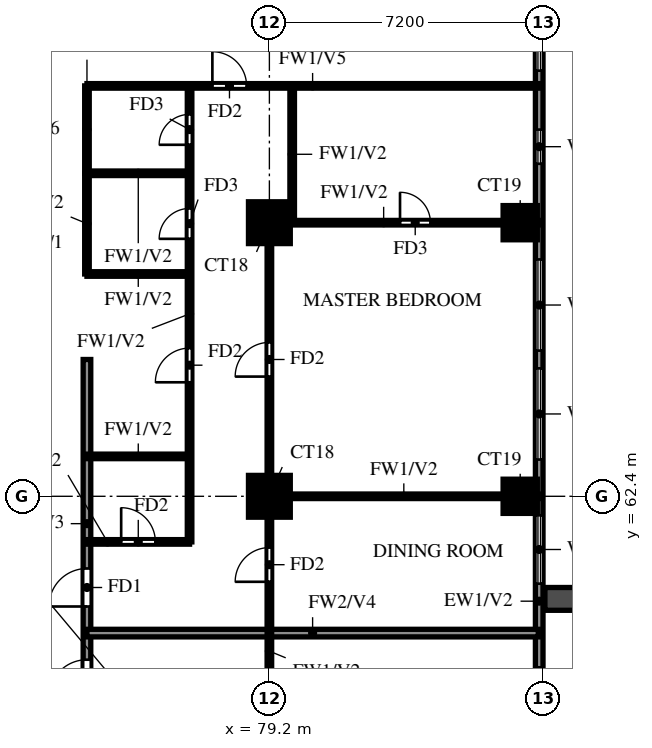
"""IFC4 building model, lengths in metres.
Left out: names, types, materials, properties, quantities, classifications, styles, units other than length and angle.
Written with IfcOpenShell. Run it as: python <this file> out.ifc"""

import sys

from ifc_helpers import new_model, si_unit, direction, frame, frame_2d, origin, origin_2d, place, context, subcontext, project, spatial, rectangle, extrude, source, transform, mapped, element, fill, save


model = new_model("IFC4")
c1 = context("Model", 3, precision=1e-05, world=origin(), true_north=direction((0.0, 1.0)))
c2 = subcontext(c1, "Body", "Model", "MODEL_VIEW")
j1 = project(units=[si_unit("LENGTHUNIT", "METRE"), si_unit("PLANEANGLEUNIT", "RADIAN")], contexts=[c1])
p1 = place(None, origin())
s1 = spatial("IfcSite", under=j1, at=p1, CompositionType="ELEMENT")
p2 = place(p1, origin())
s2 = spatial("IfcBuilding", under=s1, at=p2, CompositionType="ELEMENT")
p3 = place(p2, frame((0.0, 0.0, 120.0)))
s3 = spatial("IfcBuildingStorey", under=s2, at=p3, CompositionType="ELEMENT", Elevation=120.0)
m1 = source(origin(), c2, "Body", "SweptSolid", [
    extrude(rectangle(XDim=1.1, YDim=1.1, at=origin_2d()), origin(), (0.0, 0.0, 1.0), 3.2),
])
p4 = place(p3, frame((79.2, 62.4, 0.0), z_axis=(0.0, 0.0, 1.0), x_axis=(1.0, 0.0, 0.0)))
e1 = element("IfcColumn", 1, at=p4, inside=s3, PredefinedType="COLUMN", context=c2, shape_type="MappedRepresentation", body=[
    mapped(m1, transform((0.0, 0.0, 0.0))),
])
m2 = source(origin(), c2, "Body", "SweptSolid", [
    extrude(rectangle(XDim=0.9, YDim=0.9, at=origin_2d()), origin(), (0.0, 0.0, 1.0), 3.2),
])
p5 = place(p3, frame((85.8, 62.4, 0.0), z_axis=(0.0, 0.0, 1.0), x_axis=(1.0, 0.0, 0.0)))
e2 = element("IfcColumn", 2, at=p5, inside=s3, PredefinedType="COLUMN", context=c2, shape_type="MappedRepresentation", body=[
    mapped(m2, transform((0.0, 0.0, 0.0))),
])
p6 = place(p3, frame((79.2, 69.6, 0.0), z_axis=(0.0, 0.0, 1.0), x_axis=(1.0, 0.0, 0.0)))
e3 = element("IfcColumn", 3, at=p6, inside=s3, PredefinedType="COLUMN", context=c2, shape_type="MappedRepresentation", body=[
    mapped(m1, transform((0.0, 0.0, 0.0))),
])
p7 = place(p3, frame((85.8, 69.6, 0.0), z_axis=(0.0, 0.0, 1.0), x_axis=(1.0, 0.0, 0.0)))
e4 = element("IfcColumn", 4, at=p7, inside=s3, PredefinedType="COLUMN", context=c2, shape_type="MappedRepresentation", body=[
    mapped(m2, transform((0.0, 0.0, 0.0))),
])
p8 = place(p3, frame((86.3, 48.2, 0.0), z_axis=(0.0, 0.0, 1.0), x_axis=(0.0, 1.0, 0.0)))
e5 = element("IfcWall", 5, at=p8, inside=s3, PredefinedType="SOLIDWALL", context=c2, shape_type="SweptSolid", body=[
    extrude(rectangle(XDim=28.6, YDim=0.2, at=frame_2d((14.3, 0.0))), origin(), (0.0, 0.0, 1.0), 3.2),
])
p9 = place(p8, frame((7.9, 0.0, 0.0)))
e6 = element("IfcOpeningElement", 6, at=p9, cuts=e5, PredefinedType="OPENING", context=c2, shape_type="SweptSolid", body=[
    extrude(rectangle(XDim=1.8, YDim=2.4, at=frame_2d((0.9, 1.2))), frame((0.0, 0.11, 0.0), z_axis=(0.0, -1.0, 0.0), x_axis=(1.0, 0.0, 0.0)), (0.0, 0.0, 1.0), 0.22),
])
p10 = place(p8, frame((0.6, 0.0, 0.6)))
e7 = element("IfcOpeningElement", 7, at=p10, cuts=e5, PredefinedType="OPENING", context=c2, shape_type="SweptSolid", body=[
    extrude(rectangle(XDim=2.4, YDim=2.4, at=frame_2d((1.2, 1.2))), frame((0.0, 0.11, 0.0), z_axis=(0.0, -1.0, 0.0), x_axis=(1.0, 0.0, 0.0)), (0.0, 0.0, 1.0), 0.22),
])
p11 = place(p8, frame((3.55, 0.0, 0.6)))
e8 = element("IfcOpeningElement", 8, at=p11, cuts=e5, PredefinedType="OPENING", context=c2, shape_type="SweptSolid", body=[
    extrude(rectangle(XDim=0.9, YDim=2.4, at=frame_2d((0.45, 1.2))), frame((0.0, 0.11, 0.0), z_axis=(0.0, -1.0, 0.0), x_axis=(1.0, 0.0, 0.0)), (0.0, 0.0, 1.0), 0.22),
])
p12 = place(p8, frame((5.3, 0.0, 0.6)))
e9 = element("IfcOpeningElement", 9, at=p12, cuts=e5, PredefinedType="OPENING", context=c2, shape_type="SweptSolid", body=[
    extrude(rectangle(XDim=1.2, YDim=2.4, at=frame_2d((0.6, 1.2))), frame((0.0, 0.11, 0.0), z_axis=(0.0, -1.0, 0.0), x_axis=(1.0, 0.0, 0.0)), (0.0, 0.0, 1.0), 0.22),
])
p13 = place(p8, frame((11.9, 0.0, 0.6)))
e10 = element("IfcOpeningElement", 10, at=p13, cuts=e5, PredefinedType="OPENING", context=c2, shape_type="SweptSolid", body=[
    extrude(rectangle(XDim=1.8, YDim=2.4, at=frame_2d((0.9, 1.2))), frame((0.0, 0.11, 0.0), z_axis=(0.0, -1.0, 0.0), x_axis=(1.0, 0.0, 0.0)), (0.0, 0.0, 1.0), 0.22),
])
p14 = place(p8, frame((15.167, 0.0, 0.6)))
e11 = element("IfcOpeningElement", 11, at=p14, cuts=e5, PredefinedType="OPENING", context=c2, shape_type="SweptSolid", body=[
    extrude(rectangle(XDim=2.4, YDim=2.4, at=frame_2d((1.2, 1.2))), frame((0.0, 0.11, 0.0), z_axis=(0.0, -1.0, 0.0), x_axis=(1.0, 0.0, 0.0)), (0.0, 0.0, 1.0), 0.22),
])
p15 = place(p8, frame((18.033, 0.0, 0.6)))
e12 = element("IfcOpeningElement", 12, at=p15, cuts=e5, PredefinedType="OPENING", context=c2, shape_type="SweptSolid", body=[
    extrude(rectangle(XDim=2.4, YDim=2.4, at=frame_2d((1.2, 1.2))), frame((0.0, 0.11, 0.0), z_axis=(0.0, -1.0, 0.0), x_axis=(1.0, 0.0, 0.0)), (0.0, 0.0, 1.0), 0.22),
])
p16 = place(p8, frame((22.95, 0.0, 1.5)))
e13 = element("IfcOpeningElement", 13, at=p16, cuts=e5, PredefinedType="OPENING", context=c2, shape_type="SweptSolid", body=[
    extrude(rectangle(XDim=0.9, YDim=0.9, at=frame_2d((0.45, 0.45))), frame((0.0, 0.11, 0.0), z_axis=(0.0, -1.0, 0.0), x_axis=(1.0, 0.0, 0.0)), (0.0, 0.0, 1.0), 0.22),
])
p17 = place(p8, frame((25.4, 0.0, 0.6)))
e14 = element("IfcOpeningElement", 14, at=p17, cuts=e5, PredefinedType="OPENING", context=c2, shape_type="SweptSolid", body=[
    extrude(rectangle(XDim=2.4, YDim=2.4, at=frame_2d((1.2, 1.2))), frame((0.0, 0.11, 0.0), z_axis=(0.0, -1.0, 0.0), x_axis=(1.0, 0.0, 0.0)), (0.0, 0.0, 1.0), 0.22),
])
p18 = place(p3, frame((86.45, 59.7, 0.0), z_axis=(0.0, 0.0, 1.0), x_axis=(1.0, 0.0, 0.0)))
e15 = element("IfcWall", 15, at=p18, inside=s3, PredefinedType="SOLIDWALL", context=c2, shape_type="SweptSolid", body=[
    extrude(rectangle(XDim=2.65, YDim=0.6, at=frame_2d((1.325, 0.0))), origin(), (0.0, 0.0, 1.0), 2.85),
])
p19 = place(p3, frame((74.4, 56.4, 0.0), z_axis=(0.0, 0.0, 1.0), x_axis=(0.0, 1.0, 0.0)))
e16 = element("IfcWall", 16, at=p19, inside=s3, PredefinedType="SOLIDWALL", context=c2, shape_type="SweptSolid", body=[
    extrude(rectangle(XDim=9.6, YDim=0.2, at=frame_2d((4.8, 0.0))), origin(), (0.0, 0.0, 1.0), 3.2),
])
p20 = place(p19, frame((0.7, 0.0, 0.0)))
e17 = element("IfcOpeningElement", 17, at=p20, cuts=e16, PredefinedType="OPENING", context=c2, shape_type="SweptSolid", body=[
    extrude(rectangle(XDim=1.0, YDim=2.1, at=frame_2d((0.5, 1.05))), frame((0.0, 0.11, 0.0), z_axis=(0.0, -1.0, 0.0), x_axis=(1.0, 0.0, 0.0)), (0.0, 0.0, 1.0), 0.22),
])
p21 = place(p19, frame((3.1, 0.0, 0.0)))
e18 = element("IfcOpeningElement", 18, at=p21, cuts=e16, PredefinedType="OPENING", context=c2, shape_type="SweptSolid", body=[
    extrude(rectangle(XDim=1.0, YDim=2.1, at=frame_2d((0.5, 1.05))), frame((0.0, 0.11, 0.0), z_axis=(0.0, -1.0, 0.0), x_axis=(1.0, 0.0, 0.0)), (0.0, 0.0, 1.0), 0.22),
])
p22 = place(p3, frame((74.4, 58.8, 0.0), z_axis=(0.0, 0.0, 1.0), x_axis=(1.0, 0.0, 0.0)))
e19 = element("IfcWall", 19, at=p22, inside=s3, PredefinedType="SOLIDWALL", context=c2, shape_type="SweptSolid", body=[
    extrude(rectangle(XDim=11.875, YDim=0.2, at=frame_2d((5.938, 0.0))), origin(), (0.0, 0.0, 1.0), 2.3),
])
p23 = place(p3, frame((74.4, 61.2, 0.0), z_axis=(0.0, 0.0, 1.0), x_axis=(1.0, 0.0, 0.0)))
e20 = element("IfcWall", 20, at=p23, inside=s3, PredefinedType="PARTITIONING", context=c2, shape_type="SweptSolid", body=[
    extrude(rectangle(XDim=2.7, YDim=0.12, at=frame_2d((1.35, 0.0))), origin(), (0.0, 0.0, 1.0), 3.2),
])
p24 = place(p23, frame((0.9, 0.0, 0.0)))
e21 = element("IfcOpeningElement", 21, at=p24, cuts=e20, PredefinedType="OPENING", context=c2, shape_type="SweptSolid", body=[
    extrude(rectangle(XDim=0.9, YDim=2.1, at=frame_2d((0.45, 1.05))), frame((0.0, 0.07, 0.0), z_axis=(0.0, -1.0, 0.0), x_axis=(1.0, 0.0, 0.0)), (0.0, 0.0, 1.0), 0.14),
])
p25 = place(p3, frame((79.2, 62.4, 0.0), z_axis=(0.0, 0.0, 1.0), x_axis=(1.0, 0.0, 0.0)))
e22 = element("IfcWall", 22, at=p25, inside=s3, PredefinedType="PARTITIONING", context=c2, shape_type="SweptSolid", body=[
    extrude(rectangle(XDim=7.075, YDim=0.12, at=frame_2d((3.538, 0.0))), origin(), (0.0, 0.0, 1.0), 3.2),
])
for number, where, z_axis, x_axis in (
    (23, (74.4, 63.45, 0.0), (0.0, 0.0, 1.0), (1.0, 0.0, 0.0)),
    (24, (74.4, 68.25, 0.0), (0.0, 0.0, 1.0), (1.0, 0.0, 0.0)),
):
    element("IfcWall", number, at=place(p3, frame(where, z_axis=z_axis, x_axis=x_axis)), inside=s3, PredefinedType="PARTITIONING", context=c2, shape_type="SweptSolid", body=[
        extrude(rectangle(XDim=2.7, YDim=0.12, at=frame_2d((1.35, 0.0))), origin(), (0.0, 0.0, 1.0), 3.2),
    ])
p26 = place(p3, frame((79.2, 69.6, 0.0), z_axis=(0.0, 0.0, 1.0), x_axis=(1.0, 0.0, 0.0)))
e25 = element("IfcWall", 25, at=p26, inside=s3, PredefinedType="PARTITIONING", context=c2, shape_type="SweptSolid", body=[
    extrude(rectangle(XDim=7.075, YDim=0.12, at=frame_2d((3.538, 0.0))), origin(), (0.0, 0.0, 1.0), 3.2),
])
p27 = place(p26, frame((3.438, 0.0, 0.0)))
e26 = element("IfcOpeningElement", 26, at=p27, cuts=e25, PredefinedType="OPENING", context=c2, shape_type="SweptSolid", body=[
    extrude(rectangle(XDim=0.8, YDim=2.1, at=frame_2d((0.4, 1.05))), frame((0.0, 0.07, 0.0), z_axis=(0.0, -1.0, 0.0), x_axis=(1.0, 0.0, 0.0)), (0.0, 0.0, 1.0), 0.14),
])
p28 = place(p3, frame((74.4, 70.9, 0.0), z_axis=(0.0, 0.0, 1.0), x_axis=(1.0, 0.0, 0.0)))
e27 = element("IfcWall", 27, at=p28, inside=s3, PredefinedType="PARTITIONING", context=c2, shape_type="SweptSolid", body=[
    extrude(rectangle(XDim=2.7, YDim=0.12, at=frame_2d((1.35, 0.0))), origin(), (0.0, 0.0, 1.0), 3.2),
])
p29 = place(p3, frame((74.4, 73.2, 0.0), z_axis=(0.0, 0.0, 1.0), x_axis=(1.0, 0.0, 0.0)))
e28 = element("IfcWall", 28, at=p29, inside=s3, PredefinedType="PARTITIONING", context=c2, shape_type="SweptSolid", body=[
    extrude(rectangle(XDim=11.875, YDim=0.12, at=frame_2d((5.938, 0.0))), origin(), (0.0, 0.0, 1.0), 2.3),
])
p30 = place(p29, frame((3.3, 0.0, 0.0)))
e29 = element("IfcOpeningElement", 29, at=p30, cuts=e28, PredefinedType="OPENING", context=c2, shape_type="SweptSolid", body=[
    extrude(rectangle(XDim=0.9, YDim=2.1, at=frame_2d((0.45, 1.05))), frame((0.0, 0.07, 0.0), z_axis=(0.0, -1.0, 0.0), x_axis=(1.0, 0.0, 0.0)), (0.0, 0.0, 1.0), 0.14),
])
p31 = place(p3, frame((74.4, 68.25, 0.0), z_axis=(0.0, 0.0, 1.0), x_axis=(0.0, 1.0, 0.0)))
e30 = element("IfcWall", 30, at=p31, inside=s3, PredefinedType="PARTITIONING", context=c2, shape_type="SweptSolid", body=[
    extrude(rectangle(XDim=2.65, YDim=0.12, at=frame_2d((1.325, 0.0))), origin(), (0.0, 0.0, 1.0), 3.2),
])
p32 = place(p3, frame((74.4, 70.9, 0.0), z_axis=(0.0, 0.0, 1.0), x_axis=(0.0, 1.0, 0.0)))
e31 = element("IfcWall", 31, at=p32, inside=s3, PredefinedType="PARTITIONING", context=c2, shape_type="SweptSolid", body=[
    extrude(rectangle(XDim=2.3, YDim=0.12, at=frame_2d((1.15, 0.0))), origin(), (0.0, 0.0, 1.0), 3.2),
])
p33 = place(p3, frame((77.1, 61.2, 0.0), z_axis=(0.0, 0.0, 1.0), x_axis=(0.0, 1.0, 0.0)))
e32 = element("IfcWall", 32, at=p33, inside=s3, PredefinedType="PARTITIONING", context=c2, shape_type="SweptSolid", body=[
    extrude(rectangle(XDim=12.0, YDim=0.12, at=frame_2d((6.0, 0.0))), origin(), (0.0, 0.0, 1.0), 3.2),
])
p34 = place(p33, frame((4.2, 0.0, 0.0)))
e33 = element("IfcOpeningElement", 33, at=p34, cuts=e32, PredefinedType="OPENING", context=c2, shape_type="SweptSolid", body=[
    extrude(rectangle(XDim=0.9, YDim=2.1, at=frame_2d((0.45, 1.05))), frame((0.0, 0.07, 0.0), z_axis=(0.0, -1.0, 0.0), x_axis=(1.0, 0.0, 0.0)), (0.0, 0.0, 1.0), 0.14),
])
p35 = place(p33, frame((7.975, 0.0, 0.0)))
e34 = element("IfcOpeningElement", 34, at=p35, cuts=e32, PredefinedType="OPENING", context=c2, shape_type="SweptSolid", body=[
    extrude(rectangle(XDim=0.8, YDim=2.1, at=frame_2d((0.4, 1.05))), frame((0.0, 0.07, 0.0), z_axis=(0.0, -1.0, 0.0), x_axis=(1.0, 0.0, 0.0)), (0.0, 0.0, 1.0), 0.14),
])
p36 = place(p33, frame((10.45, 0.0, 0.0)))
e35 = element("IfcOpeningElement", 35, at=p36, cuts=e32, PredefinedType="OPENING", context=c2, shape_type="SweptSolid", body=[
    extrude(rectangle(XDim=0.8, YDim=2.1, at=frame_2d((0.4, 1.05))), frame((0.0, 0.07, 0.0), z_axis=(0.0, -1.0, 0.0), x_axis=(1.0, 0.0, 0.0)), (0.0, 0.0, 1.0), 0.14),
])
p37 = place(p3, frame((79.2, 48.125, 0.0), z_axis=(0.0, 0.0, 1.0), x_axis=(0.0, 1.0, 0.0)))
e36 = element("IfcWall", 36, at=p37, inside=s3, PredefinedType="PARTITIONING", context=c2, shape_type="SweptSolid", body=[
    extrude(rectangle(XDim=21.475, YDim=0.12, at=frame_2d((10.738, 0.0))), origin(), (0.0, 0.0, 1.0), 3.2),
])
p38 = place(p37, frame((1.288, 0.0, 0.0)))
e37 = element("IfcOpeningElement", 37, at=p38, cuts=e36, PredefinedType="OPENING", context=c2, shape_type="SweptSolid", body=[
    extrude(rectangle(XDim=0.9, YDim=2.1, at=frame_2d((0.45, 1.05))), frame((0.0, 0.07, 0.0), z_axis=(0.0, -1.0, 0.0), x_axis=(1.0, 0.0, 0.0)), (0.0, 0.0, 1.0), 0.14),
])
p39 = place(p37, frame((7.825, 0.0, 0.0)))
e38 = element("IfcOpeningElement", 38, at=p39, cuts=e36, PredefinedType="OPENING", context=c2, shape_type="SweptSolid", body=[
    extrude(rectangle(XDim=1.5, YDim=2.1, at=frame_2d((0.75, 1.05))), frame((0.0, 0.07, 0.0), z_axis=(0.0, -1.0, 0.0), x_axis=(1.0, 0.0, 0.0)), (0.0, 0.0, 1.0), 0.14),
])
p40 = place(p37, frame((12.025, 0.0, 0.0)))
e39 = element("IfcOpeningElement", 39, at=p40, cuts=e36, PredefinedType="OPENING", context=c2, shape_type="SweptSolid", body=[
    extrude(rectangle(XDim=0.9, YDim=2.1, at=frame_2d((0.45, 1.05))), frame((0.0, 0.07, 0.0), z_axis=(0.0, -1.0, 0.0), x_axis=(1.0, 0.0, 0.0)), (0.0, 0.0, 1.0), 0.14),
])
p41 = place(p37, frame((17.425, 0.0, 0.0)))
e40 = element("IfcOpeningElement", 40, at=p41, cuts=e36, PredefinedType="OPENING", context=c2, shape_type="SweptSolid", body=[
    extrude(rectangle(XDim=0.9, YDim=2.1, at=frame_2d((0.45, 1.05))), frame((0.0, 0.07, 0.0), z_axis=(0.0, -1.0, 0.0), x_axis=(1.0, 0.0, 0.0)), (0.0, 0.0, 1.0), 0.14),
])
p42 = place(p3, frame((79.8, 69.6, 0.0), z_axis=(0.0, 0.0, 1.0), x_axis=(0.0, 1.0, 0.0)))
e41 = element("IfcWall", 41, at=p42, inside=s3, PredefinedType="PARTITIONING", context=c2, shape_type="SweptSolid", body=[
    extrude(rectangle(XDim=3.6, YDim=0.12, at=frame_2d((1.8, 0.0))), origin(), (0.0, 0.0, 1.0), 3.2),
])
p43 = place(p13, origin())
e42 = element("IfcWindow", 42, at=p43, inside=s3, PartitioningType="DOUBLE_PANEL_VERTICAL", PredefinedType="WINDOW", context=c2, shape_type="SweptSolid", body=[
    extrude(rectangle(XDim=1.8, YDim=2.4, at=frame_2d((0.9, 1.2))), frame((0.0, 0.03, 0.0), z_axis=(0.0, -1.0, 0.0), x_axis=(1.0, 0.0, 0.0)), (0.0, 0.0, 1.0), 0.06),
])
fill(e10, e42)
p44 = place(p14, origin())
e43 = element("IfcWindow", 43, at=p44, inside=s3, PartitioningType="DOUBLE_PANEL_VERTICAL", PredefinedType="WINDOW", context=c2, shape_type="SweptSolid", body=[
    extrude(rectangle(XDim=2.4, YDim=2.4, at=frame_2d((1.2, 1.2))), frame((0.0, 0.03, 0.0), z_axis=(0.0, -1.0, 0.0), x_axis=(1.0, 0.0, 0.0)), (0.0, 0.0, 1.0), 0.06),
])
fill(e11, e43)
p45 = place(p15, origin())
e44 = element("IfcWindow", 44, at=p45, inside=s3, PartitioningType="DOUBLE_PANEL_VERTICAL", PredefinedType="WINDOW", context=c2, shape_type="SweptSolid", body=[
    extrude(rectangle(XDim=2.4, YDim=2.4, at=frame_2d((1.2, 1.2))), frame((0.0, 0.03, 0.0), z_axis=(0.0, -1.0, 0.0), x_axis=(1.0, 0.0, 0.0)), (0.0, 0.0, 1.0), 0.06),
])
fill(e12, e44)
p46 = place(p16, origin())
e45 = element("IfcWindow", 45, at=p46, inside=s3, PartitioningType="SINGLE_PANEL", PredefinedType="WINDOW", context=c2, shape_type="SweptSolid", body=[
    extrude(rectangle(XDim=0.9, YDim=0.9, at=frame_2d((0.45, 0.45))), frame((0.0, 0.03, 0.0), z_axis=(0.0, -1.0, 0.0), x_axis=(1.0, 0.0, 0.0)), (0.0, 0.0, 1.0), 0.06),
])
fill(e13, e45)
p47 = place(p17, origin())
e46 = element("IfcWindow", 46, at=p47, inside=s3, PartitioningType="DOUBLE_PANEL_VERTICAL", PredefinedType="WINDOW", context=c2, shape_type="SweptSolid", body=[
    extrude(rectangle(XDim=2.4, YDim=2.4, at=frame_2d((1.2, 1.2))), frame((0.0, 0.03, 0.0), z_axis=(0.0, -1.0, 0.0), x_axis=(1.0, 0.0, 0.0)), (0.0, 0.0, 1.0), 0.06),
])
fill(e14, e46)
p48 = place(p20, origin())
e47 = element("IfcDoor", 47, at=p48, inside=s3, OperationType="SINGLE_SWING_LEFT", PredefinedType="DOOR", context=c2, shape_type="SweptSolid", body=[
    extrude(rectangle(XDim=1.0, YDim=2.1, at=frame_2d((0.5, 1.05))), frame((0.0, 0.025, 0.0), z_axis=(0.0, -1.0, 0.0), x_axis=(1.0, 0.0, 0.0)), (0.0, 0.0, 1.0), 0.05),
])
fill(e17, e47)
p49 = place(p21, origin())
e48 = element("IfcDoor", 48, at=p49, inside=s3, OperationType="SINGLE_SWING_LEFT", PredefinedType="DOOR", context=c2, shape_type="SweptSolid", body=[
    extrude(rectangle(XDim=1.0, YDim=2.1, at=frame_2d((0.5, 1.05))), frame((0.0, 0.025, 0.0), z_axis=(0.0, -1.0, 0.0), x_axis=(1.0, 0.0, 0.0)), (0.0, 0.0, 1.0), 0.05),
])
fill(e18, e48)
p50 = place(p40, origin())
e49 = element("IfcDoor", 49, at=p50, inside=s3, OperationType="SINGLE_SWING_RIGHT", PredefinedType="DOOR", context=c2, shape_type="SweptSolid", body=[
    extrude(rectangle(XDim=0.9, YDim=2.1, at=frame_2d((0.45, 1.05))), frame((0.0, 0.025, 0.0), z_axis=(0.0, -1.0, 0.0), x_axis=(1.0, 0.0, 0.0)), (0.0, 0.0, 1.0), 0.05),
])
fill(e39, e49)
p51 = place(p41, origin())
e50 = element("IfcDoor", 50, at=p51, inside=s3, OperationType="SINGLE_SWING_LEFT", PredefinedType="DOOR", context=c2, shape_type="SweptSolid", body=[
    extrude(rectangle(XDim=0.9, YDim=2.1, at=frame_2d((0.45, 1.05))), frame((0.0, 0.025, 0.0), z_axis=(0.0, -1.0, 0.0), x_axis=(1.0, 0.0, 0.0)), (0.0, 0.0, 1.0), 0.05),
])
fill(e40, e50)
p52 = place(p27, origin())
e51 = element("IfcDoor", 51, at=p52, inside=s3, OperationType="SINGLE_SWING_LEFT", PredefinedType="DOOR", context=c2, shape_type="SweptSolid", body=[
    extrude(rectangle(XDim=0.8, YDim=2.1, at=frame_2d((0.4, 1.05))), frame((0.0, 0.025, 0.0), z_axis=(0.0, -1.0, 0.0), x_axis=(1.0, 0.0, 0.0)), (0.0, 0.0, 1.0), 0.05),
])
fill(e26, e51)
p53 = place(p30, origin())
e52 = element("IfcDoor", 52, at=p53, inside=s3, OperationType="SINGLE_SWING_RIGHT", PredefinedType="DOOR", context=c2, shape_type="SweptSolid", body=[
    extrude(rectangle(XDim=0.9, YDim=2.1, at=frame_2d((0.45, 1.05))), frame((0.0, 0.025, 0.0), z_axis=(0.0, -1.0, 0.0), x_axis=(1.0, 0.0, 0.0)), (0.0, 0.0, 1.0), 0.05),
])
fill(e29, e52)
p54 = place(p24, origin())
e53 = element("IfcDoor", 53, at=p54, inside=s3, OperationType="SINGLE_SWING_LEFT", PredefinedType="DOOR", context=c2, shape_type="SweptSolid", body=[
    extrude(rectangle(XDim=0.9, YDim=2.1, at=frame_2d((0.45, 1.05))), frame((0.0, 0.025, 0.0), z_axis=(0.0, -1.0, 0.0), x_axis=(1.0, 0.0, 0.0)), (0.0, 0.0, 1.0), 0.05),
])
fill(e21, e53)
p55 = place(p34, origin())
e54 = element("IfcDoor", 54, at=p55, inside=s3, OperationType="SINGLE_SWING_LEFT", PredefinedType="DOOR", context=c2, shape_type="SweptSolid", body=[
    extrude(rectangle(XDim=0.9, YDim=2.1, at=frame_2d((0.45, 1.05))), frame((0.0, 0.025, 0.0), z_axis=(0.0, -1.0, 0.0), x_axis=(1.0, 0.0, 0.0)), (0.0, 0.0, 1.0), 0.05),
])
fill(e33, e54)
p56 = place(p35, origin())
e55 = element("IfcDoor", 55, at=p56, inside=s3, OperationType="SINGLE_SWING_RIGHT", PredefinedType="DOOR", context=c2, shape_type="SweptSolid", body=[
    extrude(rectangle(XDim=0.8, YDim=2.1, at=frame_2d((0.4, 1.05))), frame((0.0, 0.025, 0.0), z_axis=(0.0, -1.0, 0.0), x_axis=(1.0, 0.0, 0.0)), (0.0, 0.0, 1.0), 0.05),
])
fill(e34, e55)
p57 = place(p36, origin())
e56 = element("IfcDoor", 56, at=p57, inside=s3, OperationType="SINGLE_SWING_LEFT", PredefinedType="DOOR", context=c2, shape_type="SweptSolid", body=[
    extrude(rectangle(XDim=0.8, YDim=2.1, at=frame_2d((0.4, 1.05))), frame((0.0, 0.025, 0.0), z_axis=(0.0, -1.0, 0.0), x_axis=(1.0, 0.0, 0.0)), (0.0, 0.0, 1.0), 0.05),
])
fill(e35, e56)
save(model, sys.argv[1])
